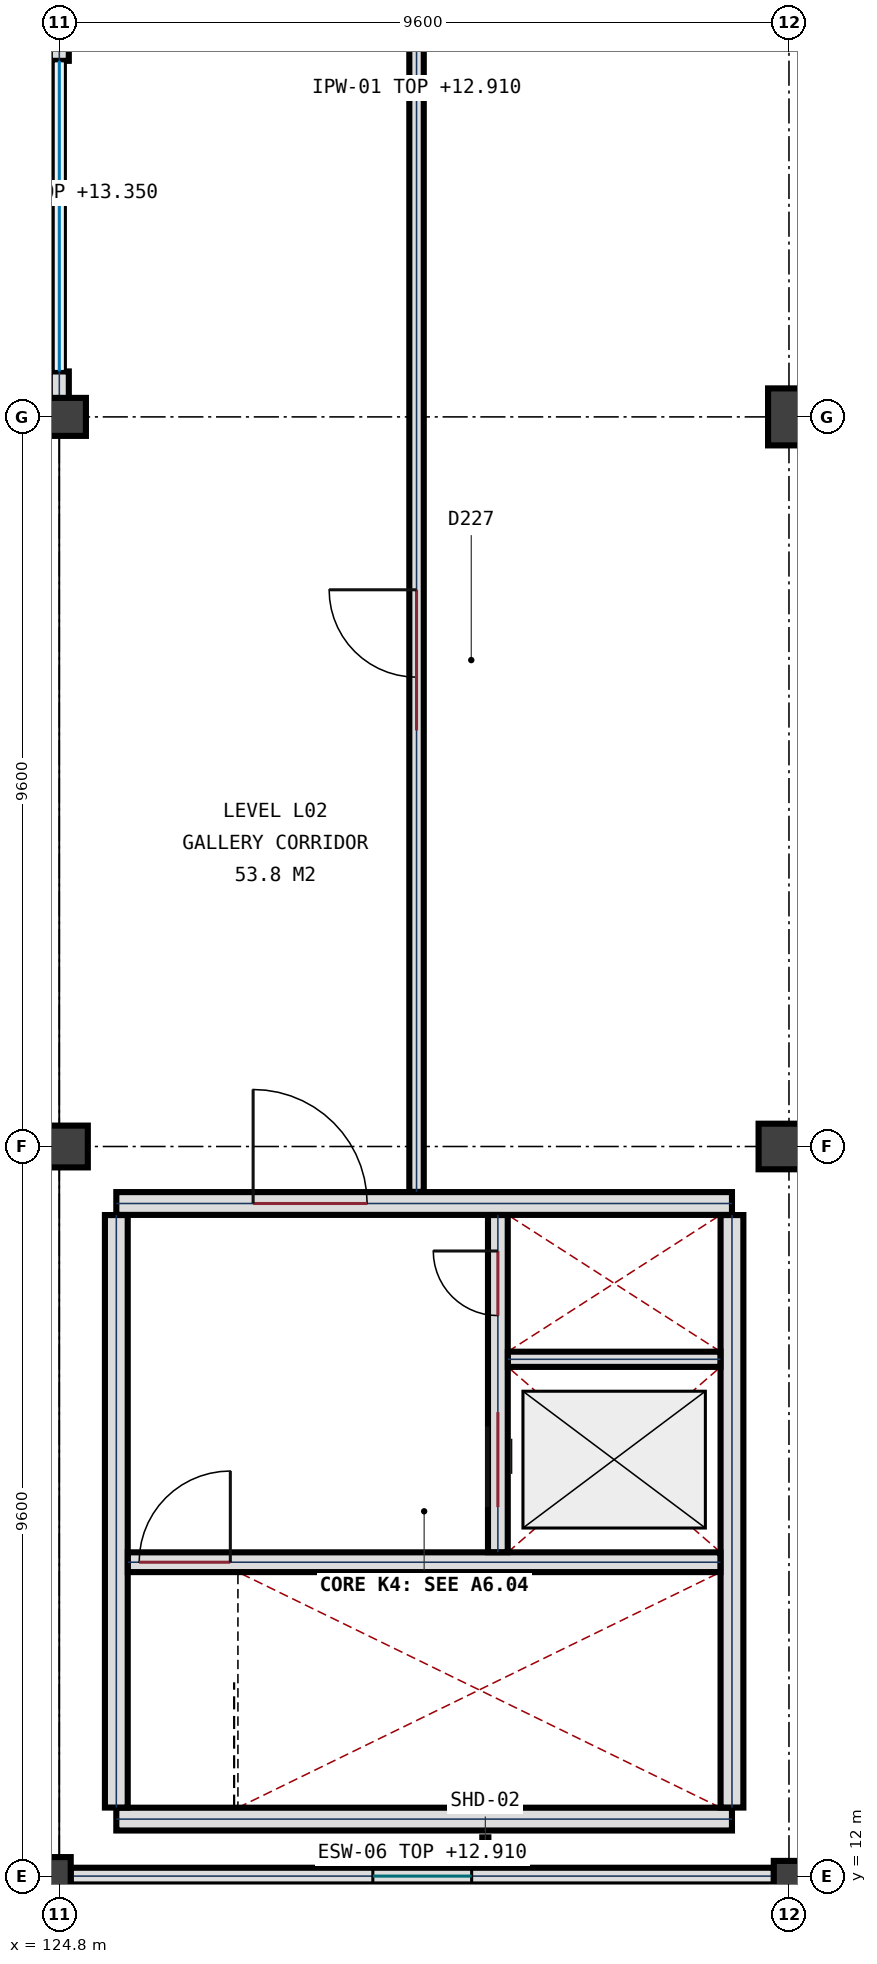
"""IFC4 building model, lengths in metres.
Left out: names, types, materials, properties, quantities, classifications, styles, units other than length and angle.
Written with IfcOpenShell. Run it as: python <this file> out.ifc"""

import sys

from ifc_helpers import new_model, si_unit, direction, frame, frame_2d, origin, origin_2d, place, context, subcontext, project, spatial, rectangle, hollow_rectangle, i_section, extrude, element, fill, save


model = new_model("IFC4")
c1 = context("Model", 3, precision=1e-05, world=origin(), true_north=direction((0.0, 1.0)))
c2 = subcontext(c1, "Body", "Model", "MODEL_VIEW")
j1 = project(units=[si_unit("LENGTHUNIT", "METRE"), si_unit("PLANEANGLEUNIT", "RADIAN")], contexts=[c1])
p1 = place(None, origin())
s1 = spatial("IfcSite", under=j1, at=p1, CompositionType="ELEMENT")
p2 = place(p1, origin())
s2 = spatial("IfcBuilding", under=s1, at=p2, CompositionType="ELEMENT")
p3 = place(p2, frame((0.0, 0.0, 9.9)))
s3 = spatial("IfcBuildingStorey", under=s2, at=p3, CompositionType="ELEMENT", Elevation=9.9)
p4 = place(p3, frame((124.8, 12.0, 0.0), z_axis=(0.0, 0.0, 1.0), x_axis=(1.0, 0.0, 0.0)))
e1 = element("IfcColumn", 1, at=p4, inside=s3, PredefinedType="COLUMN", context=c2, shape_type="SweptSolid", body=[
    extrude(i_section(OverallWidth=0.3, OverallDepth=0.5, WebThickness=0.014, FlangeThickness=0.028, FilletRadius=0.027, at=origin_2d()), origin(), (0.0, 0.0, 1.0), 4.5),
])
p5 = place(p3, frame((124.8, 21.6, 0.0), z_axis=(0.0, 0.0, 1.0), x_axis=(1.0, 0.0, 0.0)))
e2 = element("IfcColumn", 2, at=p5, inside=s3, PredefinedType="COLUMN", context=c2, shape_type="SweptSolid", body=[
    extrude(rectangle(XDim=0.75, YDim=0.55, at=origin_2d()), origin(), (0.0, 0.0, 1.0), 4.5),
])
p6 = place(p3, frame((124.8, 31.2, 0.0), z_axis=(0.0, 0.0, 1.0), x_axis=(1.0, 0.0, 0.0)))
e3 = element("IfcColumn", 3, at=p6, inside=s3, PredefinedType="COLUMN", context=c2, shape_type="SweptSolid", body=[
    extrude(rectangle(XDim=0.7, YDim=0.5, at=origin_2d()), origin(), (0.0, 0.0, 1.0), 4.5),
])
p7 = place(p3, frame((134.4, 12.0, 0.0), z_axis=(0.0, 0.0, 1.0), x_axis=(1.0, 0.0, 0.0)))
e4 = element("IfcColumn", 4, at=p7, inside=s3, PredefinedType="COLUMN", context=c2, shape_type="SweptSolid", body=[
    extrude(hollow_rectangle(XDim=0.4, YDim=0.4, WallThickness=0.016, at=origin_2d()), origin(), (0.0, 0.0, 1.0), 4.5),
])
p8 = place(p3, frame((134.4, 21.6, 0.0), z_axis=(0.0, 0.0, 1.0), x_axis=(1.0, 0.0, 0.0)))
e5 = element("IfcColumn", 5, at=p8, inside=s3, PredefinedType="COLUMN", context=c2, shape_type="SweptSolid", body=[
    extrude(rectangle(XDim=0.8, YDim=0.6, at=origin_2d()), origin(), (0.0, 0.0, 1.0), 4.5),
])
p9 = place(p3, frame((134.4, 31.2, 0.0), z_axis=(0.0, 0.0, 1.0), x_axis=(0.0, 1.0, 0.0)))
e6 = element("IfcColumn", 6, at=p9, inside=s3, PredefinedType="COLUMN", context=c2, shape_type="SweptSolid", body=[
    extrude(rectangle(XDim=0.75, YDim=0.55, at=origin_2d()), origin(), (0.0, 0.0, 1.0), 4.5),
])
p10 = place(p3, frame((124.8, 31.448, 0.0), z_axis=(0.0, 0.0, 1.0), x_axis=(0.0, 1.0, 0.0)))
e7 = element("IfcWall", 7, at=p10, inside=s3, PredefinedType="SOLIDWALL", context=c2, shape_type="SweptSolid", body=[
    extrude(rectangle(XDim=0.35, YDim=0.25, at=frame_2d((0.175, 0.0))), origin(), (0.0, 0.0, 1.0), 3.45),
])
p11 = place(p3, frame((124.8, 35.885, 0.0), z_axis=(0.0, 0.0, 1.0), x_axis=(0.0, 1.0, 0.0)))
e8 = element("IfcWall", 8, at=p11, inside=s3, PredefinedType="SOLIDWALL", context=c2, shape_type="SweptSolid", body=[
    extrude(rectangle(XDim=0.3, YDim=0.25, at=frame_2d((0.15, 0.0))), origin(), (0.0, 0.0, 1.0), 3.45),
])
p12 = place(p3, frame((134.202, 12.0, 0.0), z_axis=(0.0, 0.0, 1.0), x_axis=(-1.0, 0.0, 0.0)))
e9 = element("IfcWall", 9, at=p12, inside=s3, PredefinedType="SOLIDWALL", context=c2, shape_type="SweptSolid", body=[
    extrude(rectangle(XDim=9.254, YDim=0.22, at=frame_2d((4.627, 0.0))), origin(), (0.0, 0.0, 1.0), 3.01),
])
p13 = place(p12, frame((3.977, 0.0, 0.95)))
e10 = element("IfcOpeningElement", 10, at=p13, cuts=e9, PredefinedType="OPENING", context=c2, shape_type="SweptSolid", body=[
    extrude(rectangle(XDim=1.3, YDim=1.4, at=frame_2d((0.65, 0.7))), frame((0.0, 0.12, 0.0), z_axis=(0.0, -1.0, 0.0), x_axis=(1.0, 0.0, 0.0)), (0.0, 0.0, 1.0), 0.24),
])
p14 = place(p3, frame((133.65, 12.75, 0.0), z_axis=(0.0, 0.0, 1.0), x_axis=(-1.0, 0.0, 0.0)))
e11 = element("IfcWall", 11, at=p14, inside=s3, PredefinedType="SHEAR", context=c2, shape_type="SweptSolid", body=[
    extrude(rectangle(XDim=8.1, YDim=0.3, at=frame_2d((4.05, 0.0))), origin(), (0.0, 0.0, 1.0), 4.5),
])
p15 = place(p3, frame((125.55, 20.85, 0.0), z_axis=(0.0, 0.0, 1.0), x_axis=(1.0, 0.0, 0.0)))
e12 = element("IfcWall", 12, at=p15, inside=s3, PredefinedType="SHEAR", context=c2, shape_type="SweptSolid", body=[
    extrude(rectangle(XDim=8.1, YDim=0.3, at=frame_2d((4.05, 0.0))), origin(), (0.0, 0.0, 1.0), 4.5),
])
p16 = place(p15, frame((1.8, 0.0, 0.0)))
e13 = element("IfcOpeningElement", 13, at=p16, cuts=e12, PredefinedType="OPENING", context=c2, shape_type="SweptSolid", body=[
    extrude(rectangle(XDim=1.5, YDim=2.25, at=frame_2d((0.75, 1.125))), frame((0.0, 0.16, 0.0), z_axis=(0.0, -1.0, 0.0), x_axis=(1.0, 0.0, 0.0)), (0.0, 0.0, 1.0), 0.32),
])
for number, where, z_axis, x_axis in (
    (14, (125.55, 12.902, 0.0), (0.0, 0.0, 1.0), (0.0, 1.0, 0.0)),
    (15, (133.65, 20.698, 0.0), (0.0, 0.0, 1.0), (0.0, -1.0, 0.0)),
):
    element("IfcWall", number, at=place(p3, frame(where, z_axis=z_axis, x_axis=x_axis)), inside=s3, PredefinedType="SHEAR", context=c2, shape_type="SweptSolid", body=[
        extrude(rectangle(XDim=7.796, YDim=0.3, at=frame_2d((3.898, 0.0))), origin(), (0.0, 0.0, 1.0), 4.5),
    ])
p17 = place(p3, frame((125.702, 16.13, 0.0), z_axis=(0.0, 0.0, 1.0), x_axis=(1.0, 0.0, 0.0)))
e16 = element("IfcWall", 16, at=p17, inside=s3, PredefinedType="SHEAR", context=c2, shape_type="SweptSolid", body=[
    extrude(rectangle(XDim=7.796, YDim=0.26, at=frame_2d((3.898, 0.0))), origin(), (0.0, 0.0, 1.0), 4.5),
])
p18 = place(p17, frame((0.148, 0.0, 0.0)))
e17 = element("IfcOpeningElement", 17, at=p18, cuts=e16, PredefinedType="OPENING", context=c2, shape_type="SweptSolid", body=[
    extrude(rectangle(XDim=1.2, YDim=2.2, at=frame_2d((0.6, 1.1))), frame((0.0, 0.14, 0.0), z_axis=(0.0, -1.0, 0.0), x_axis=(1.0, 0.0, 0.0)), (0.0, 0.0, 1.0), 0.28),
])
p19 = place(p3, frame((130.57, 16.262, 0.0), z_axis=(0.0, 0.0, 1.0), x_axis=(0.0, 1.0, 0.0)))
e18 = element("IfcWall", 18, at=p19, inside=s3, PredefinedType="SHEAR", context=c2, shape_type="SweptSolid", body=[
    extrude(rectangle(XDim=4.436, YDim=0.26, at=frame_2d((2.218, 0.0))), origin(), (0.0, 0.0, 1.0), 4.5),
])
p20 = place(p19, frame((3.113, 0.0, 0.0)))
e19 = element("IfcOpeningElement", 19, at=p20, cuts=e18, PredefinedType="OPENING", context=c2, shape_type="SweptSolid", body=[
    extrude(rectangle(XDim=0.85, YDim=2.05, at=frame_2d((0.425, 1.025))), frame((0.0, 0.14, 0.0), z_axis=(0.0, -1.0, 0.0), x_axis=(1.0, 0.0, 0.0)), (0.0, 0.0, 1.0), 0.28),
])
p21 = place(p19, frame((0.593, 0.0, 0.0)))
e20 = element("IfcOpeningElement", 20, at=p21, cuts=e18, PredefinedType="OPENING", context=c2, shape_type="SweptSolid", body=[
    extrude(rectangle(XDim=1.25, YDim=2.2, at=frame_2d((0.625, 1.1))), frame((0.0, 0.14, 0.0), z_axis=(0.0, -1.0, 0.0), x_axis=(1.0, 0.0, 0.0)), (0.0, 0.0, 1.0), 0.28),
])
p22 = place(p3, frame((130.702, 18.8, 0.0), z_axis=(0.0, 0.0, 1.0), x_axis=(1.0, 0.0, 0.0)))
e21 = element("IfcWall", 21, at=p22, inside=s3, PredefinedType="PLUMBINGWALL", context=c2, shape_type="SweptSolid", body=[
    extrude(rectangle(XDim=2.796, YDim=0.2, at=frame_2d((1.398, 0.0))), origin(), (0.0, 0.0, 1.0), 4.45),
])
p23 = place(p3, frame((129.5, 21.003, 0.0), z_axis=(0.0, 0.0, 1.0), x_axis=(0.0, 1.0, 0.0)))
e22 = element("IfcWall", 22, at=p23, inside=s3, PredefinedType="PARTITIONING", context=c2, shape_type="SweptSolid", body=[
    extrude(rectangle(XDim=19.668, YDim=0.19, at=frame_2d((9.834, 0.0))), origin(), (0.0, 0.0, 1.0), 3.01),
])
p24 = place(p23, frame((6.072, 0.0, 0.0)))
e23 = element("IfcOpeningElement", 23, at=p24, cuts=e22, PredefinedType="OPENING", context=c2, shape_type="SweptSolid", body=[
    extrude(rectangle(XDim=1.85, YDim=2.35, at=frame_2d((0.925, 1.175))), frame((0.0, 0.105, 0.0), z_axis=(0.0, -1.0, 0.0), x_axis=(1.0, 0.0, 0.0)), (0.0, 0.0, 1.0), 0.21),
])
p25 = place(p13, origin())
e24 = element("IfcWindow", 24, at=p25, inside=s3, PartitioningType="SINGLE_PANEL", PredefinedType="WINDOW", context=c2, shape_type="SweptSolid", body=[
    extrude(rectangle(XDim=1.3, YDim=1.4, at=frame_2d((0.65, 0.7))), frame((0.0, 0.032, 0.0), z_axis=(0.0, -1.0, 0.0), x_axis=(1.0, 0.0, 0.0)), (0.0, 0.0, 1.0), 0.065),
])
fill(e10, e24)
p26 = place(p16, origin())
e25 = element("IfcDoor", 25, at=p26, inside=s3, OperationType="SINGLE_SWING_LEFT", PredefinedType="DOOR", context=c2, shape_type="SweptSolid", body=[
    extrude(rectangle(XDim=1.5, YDim=2.25, at=frame_2d((0.75, 1.125))), frame((0.0, 0.032, 0.0), z_axis=(0.0, -1.0, 0.0), x_axis=(1.0, 0.0, 0.0)), (0.0, 0.0, 1.0), 0.065),
])
fill(e13, e25)
p27 = place(p18, origin())
e26 = element("IfcDoor", 26, at=p27, inside=s3, OperationType="SINGLE_SWING_RIGHT", PredefinedType="DOOR", context=c2, shape_type="SweptSolid", body=[
    extrude(rectangle(XDim=1.2, YDim=2.2, at=frame_2d((0.6, 1.1))), frame((0.0, 0.032, 0.0), z_axis=(0.0, -1.0, 0.0), x_axis=(1.0, 0.0, 0.0)), (0.0, 0.0, 1.0), 0.065),
])
fill(e17, e26)
p28 = place(p20, origin())
e27 = element("IfcDoor", 27, at=p28, inside=s3, OperationType="SINGLE_SWING_RIGHT", PredefinedType="DOOR", context=c2, shape_type="SweptSolid", body=[
    extrude(rectangle(XDim=0.85, YDim=2.05, at=frame_2d((0.425, 1.025))), frame((0.0, 0.032, 0.0), z_axis=(0.0, -1.0, 0.0), x_axis=(1.0, 0.0, 0.0)), (0.0, 0.0, 1.0), 0.065),
])
fill(e19, e27)
p29 = place(p21, origin())
e28 = element("IfcDoor", 28, at=p29, inside=s3, OperationType="SLIDING_TO_LEFT", PredefinedType="DOOR", context=c2, shape_type="SweptSolid", body=[
    extrude(rectangle(XDim=1.25, YDim=2.2, at=frame_2d((0.625, 1.1))), frame((0.0, 0.032, 0.0), z_axis=(0.0, -1.0, 0.0), x_axis=(1.0, 0.0, 0.0)), (0.0, 0.0, 1.0), 0.065),
])
fill(e20, e28)
p30 = place(p24, origin())
e29 = element("IfcDoor", 29, at=p30, inside=s3, OperationType="SINGLE_SWING_RIGHT", PredefinedType="DOOR", context=c2, shape_type="SweptSolid", body=[
    extrude(rectangle(XDim=1.85, YDim=2.35, at=frame_2d((0.925, 1.175))), frame((0.0, 0.032, 0.0), z_axis=(0.0, -1.0, 0.0), x_axis=(1.0, 0.0, 0.0)), (0.0, 0.0, 1.0), 0.065),
])
fill(e23, e29)
save(model, sys.argv[1])
